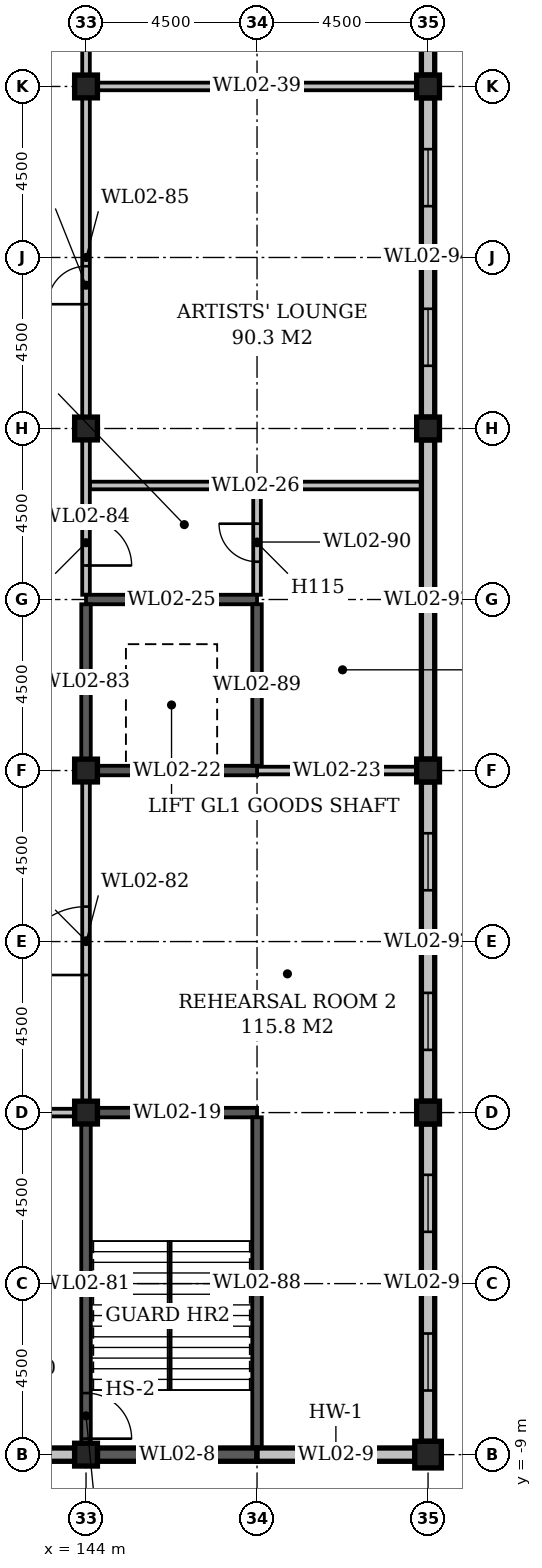
"""IFC4 building model, lengths in metres.
Left out: names, types, materials, properties, quantities, classifications, styles, units other than length and angle.
Written with IfcOpenShell. Run it as: python <this file> out.ifc"""

import sys

from ifc_helpers import new_model, si_unit, direction, frame, frame_2d, origin, origin_2d, place, context, subcontext, project, spatial, rectangle, extrude, element, fill, save


model = new_model("IFC4")
c1 = context("Model", 3, precision=1e-05, world=origin(), true_north=direction((0.0, 1.0)))
c2 = subcontext(c1, "Body", "Model", "MODEL_VIEW")
j1 = project(units=[si_unit("LENGTHUNIT", "METRE"), si_unit("PLANEANGLEUNIT", "RADIAN")], contexts=[c1])
p1 = place(None, origin())
s1 = spatial("IfcSite", under=j1, at=p1, CompositionType="ELEMENT")
p2 = place(p1, origin())
s2 = spatial("IfcBuilding", under=s1, at=p2, CompositionType="ELEMENT")
p3 = place(p2, frame((0.0, 0.0, 14.0)))
s3 = spatial("IfcBuildingStorey", under=s2, at=p3, CompositionType="ELEMENT", Elevation=14.0)
for number, where, z_axis, x_axis in (
    (1, (144.0, -9.0, 0.0), (0.0, 0.0, 1.0), (1.0, 0.0, 0.0)),
    (2, (144.0, 0.0, 0.0), (0.0, 0.0, 1.0), (1.0, 0.0, 0.0)),
    (3, (144.0, 9.0, 0.0), (0.0, 0.0, 1.0), (1.0, 0.0, 0.0)),
    (4, (144.0, 18.0, 0.0), (0.0, 0.0, 1.0), (1.0, 0.0, 0.0)),
    (5, (144.0, 27.0, 0.0), (0.0, 0.0, 1.0), (1.0, 0.0, 0.0)),
):
    element("IfcColumn", number, at=place(p3, frame(where, z_axis=z_axis, x_axis=x_axis)), inside=s3, PredefinedType="COLUMN", context=c2, shape_type="SweptSolid", body=[
        extrude(rectangle(XDim=0.6, YDim=0.6, at=origin_2d()), origin(), (0.0, 0.0, 1.0), 4.7),
    ])
p4 = place(p3, frame((153.0, -9.0, 0.0), z_axis=(0.0, 0.0, 1.0), x_axis=(1.0, 0.0, 0.0)))
e6 = element("IfcColumn", 6, at=p4, inside=s3, PredefinedType="COLUMN", context=c2, shape_type="SweptSolid", body=[
    extrude(rectangle(XDim=0.7, YDim=0.7, at=origin_2d()), origin(), (0.0, 0.0, 1.0), 4.7),
])
for number, where, z_axis, x_axis in (
    (7, (153.0, 0.0, 0.0), (0.0, 0.0, 1.0), (1.0, 0.0, 0.0)),
    (8, (153.0, 9.0, 0.0), (0.0, 0.0, 1.0), (1.0, 0.0, 0.0)),
    (9, (153.0, 18.0, 0.0), (0.0, 0.0, 1.0), (1.0, 0.0, 0.0)),
    (10, (153.0, 27.0, 0.0), (0.0, 0.0, 1.0), (1.0, 0.0, 0.0)),
):
    element("IfcColumn", number, at=place(p3, frame(where, z_axis=z_axis, x_axis=x_axis)), inside=s3, PredefinedType="COLUMN", context=c2, shape_type="SweptSolid", body=[
        extrude(rectangle(XDim=0.6, YDim=0.6, at=origin_2d()), origin(), (0.0, 0.0, 1.0), 4.7),
    ])
p5 = place(p3, frame((135.3, -9.0, 0.0), z_axis=(0.0, 0.0, 1.0), x_axis=(1.0, 0.0, 0.0)))
e11 = element("IfcWall", 11, at=p5, inside=s3, PredefinedType="STANDARD", context=c2, shape_type="SweptSolid", body=[
    extrude(rectangle(XDim=8.4, YDim=0.35, at=frame_2d((4.2, 0.0))), origin(), (0.0, 0.0, 1.0), 4.1),
])
p6 = place(p5, frame((1.35, 0.0, 1.0)))
e12 = element("IfcOpeningElement", 12, at=p6, cuts=e11, PredefinedType="OPENING", context=c2, shape_type="SweptSolid", body=[
    extrude(rectangle(XDim=1.5, YDim=2.4, at=frame_2d((0.75, 1.2))), frame((0.0, 0.187, 0.0), z_axis=(0.0, -1.0, 0.0), x_axis=(1.0, 0.0, 0.0)), (0.0, 0.0, 1.0), 0.374),
])
p7 = place(p3, frame((144.3, -9.0, 0.0), z_axis=(0.0, 0.0, 1.0), x_axis=(1.0, 0.0, 0.0)))
e13 = element("IfcWall", 13, at=p7, inside=s3, PredefinedType="STANDARD", context=c2, shape_type="SweptSolid", body=[
    extrude(rectangle(XDim=4.2, YDim=0.35, at=frame_2d((2.1, 0.0))), origin(), (0.0, 0.0, 1.0), 5.0),
])
p8 = place(p3, frame((148.5, -9.0, 0.0), z_axis=(0.0, 0.0, 1.0), x_axis=(1.0, 0.0, 0.0)))
e14 = element("IfcWall", 14, at=p8, inside=s3, PredefinedType="STANDARD", context=c2, shape_type="SweptSolid", body=[
    extrude(rectangle(XDim=4.15, YDim=0.35, at=frame_2d((2.075, 0.0))), origin(), (0.0, 0.0, 1.0), 4.1),
])
p9 = place(p8, frame((1.325, 0.0, 1.0)))
e15 = element("IfcOpeningElement", 15, at=p9, cuts=e14, PredefinedType="OPENING", context=c2, shape_type="SweptSolid", body=[
    extrude(rectangle(XDim=1.5, YDim=2.4, at=frame_2d((0.75, 1.2))), frame((0.0, 0.187, 0.0), z_axis=(0.0, -1.0, 0.0), x_axis=(1.0, 0.0, 0.0)), (0.0, 0.0, 1.0), 0.374),
])
p10 = place(p3, frame((135.4, 0.0, 0.0), z_axis=(0.0, 0.0, 1.0), x_axis=(1.0, 0.0, 0.0)))
e16 = element("IfcWall", 16, at=p10, inside=s3, PredefinedType="STANDARD", context=c2, shape_type="SweptSolid", body=[
    extrude(rectangle(XDim=8.3, YDim=0.2, at=frame_2d((4.15, 0.0))), origin(), (0.0, 0.0, 1.0), 4.7),
])
p11 = place(p10, frame((5.77, 0.0, 0.0)))
e17 = element("IfcOpeningElement", 17, at=p11, cuts=e16, PredefinedType="OPENING", context=c2, shape_type="SweptSolid", body=[
    extrude(rectangle(XDim=1.2, YDim=2.1, at=frame_2d((0.6, 1.05))), frame((0.0, 0.112, 0.0), z_axis=(0.0, -1.0, 0.0), x_axis=(1.0, 0.0, 0.0)), (0.0, 0.0, 1.0), 0.224),
])
p12 = place(p10, frame((1.37, 0.0, 0.0)))
e18 = element("IfcOpeningElement", 18, at=p12, cuts=e16, PredefinedType="OPENING", context=c2, shape_type="SweptSolid", body=[
    extrude(rectangle(XDim=1.0, YDim=2.1, at=frame_2d((0.5, 1.05))), frame((0.0, 0.112, 0.0), z_axis=(0.0, -1.0, 0.0), x_axis=(1.0, 0.0, 0.0)), (0.0, 0.0, 1.0), 0.224),
])
for number, where, z_axis, x_axis in (
    (19, (144.3, 0.0, 0.0), (0.0, 0.0, 1.0), (1.0, 0.0, 0.0)),
    (20, (144.3, 9.0, 0.0), (0.0, 0.0, 1.0), (1.0, 0.0, 0.0)),
):
    element("IfcWall", number, at=place(p3, frame(where, z_axis=z_axis, x_axis=x_axis)), inside=s3, PredefinedType="STANDARD", context=c2, shape_type="SweptSolid", body=[
        extrude(rectangle(XDim=4.2, YDim=0.25, at=frame_2d((2.1, 0.0))), origin(), (0.0, 0.0, 1.0), 5.0),
    ])
p13 = place(p3, frame((148.5, 9.0, 0.0), z_axis=(0.0, 0.0, 1.0), x_axis=(1.0, 0.0, 0.0)))
e21 = element("IfcWall", 21, at=p13, inside=s3, PredefinedType="STANDARD", context=c2, shape_type="SweptSolid", body=[
    extrude(rectangle(XDim=4.2, YDim=0.2, at=frame_2d((2.1, 0.0))), origin(), (0.0, 0.0, 1.0), 4.7),
])
p14 = place(p3, frame((144.0, 13.5, 0.0), z_axis=(0.0, 0.0, 1.0), x_axis=(1.0, 0.0, 0.0)))
e22 = element("IfcWall", 22, at=p14, inside=s3, PredefinedType="STANDARD", context=c2, shape_type="SweptSolid", body=[
    extrude(rectangle(XDim=4.5, YDim=0.25, at=frame_2d((2.25, 0.0))), origin(), (0.0, 0.0, 1.0), 5.0),
])
p15 = place(p14, frame((1.72, 0.0, 0.0)))
e23 = element("IfcOpeningElement", 23, at=p15, cuts=e22, PredefinedType="OPENING", context=c2, shape_type="SweptSolid", body=[
    extrude(rectangle(XDim=1.1, YDim=2.1, at=frame_2d((0.55, 1.05))), frame((0.0, 0.137, 0.0), z_axis=(0.0, -1.0, 0.0), x_axis=(1.0, 0.0, 0.0)), (0.0, 0.0, 1.0), 0.274),
])
p16 = place(p3, frame((144.1, 16.5, 0.0), z_axis=(0.0, 0.0, 1.0), x_axis=(1.0, 0.0, 0.0)))
e24 = element("IfcWall", 24, at=p16, inside=s3, PredefinedType="STANDARD", context=c2, shape_type="SweptSolid", body=[
    extrude(rectangle(XDim=8.725, YDim=0.2, at=frame_2d((4.362, 0.0))), origin(), (0.0, 0.0, 1.0), 4.7),
])
p17 = place(p3, frame((144.3, 27.0, 0.0), z_axis=(0.0, 0.0, 1.0), x_axis=(1.0, 0.0, 0.0)))
e25 = element("IfcWall", 25, at=p17, inside=s3, PredefinedType="STANDARD", context=c2, shape_type="SweptSolid", body=[
    extrude(rectangle(XDim=8.4, YDim=0.2, at=frame_2d((4.2, 0.0))), origin(), (0.0, 0.0, 1.0), 4.7),
])
p18 = place(p3, frame((144.0, -8.7, 0.0), z_axis=(0.0, 0.0, 1.0), x_axis=(0.0, 1.0, 0.0)))
e26 = element("IfcWall", 26, at=p18, inside=s3, PredefinedType="STANDARD", context=c2, shape_type="SweptSolid", body=[
    extrude(rectangle(XDim=8.4, YDim=0.25, at=frame_2d((4.2, 0.0))), origin(), (0.0, 0.0, 1.0), 5.0),
])
p19 = place(p18, frame((0.12, 0.0, 0.0)))
e27 = element("IfcOpeningElement", 27, at=p19, cuts=e26, PredefinedType="OPENING", context=c2, shape_type="SweptSolid", body=[
    extrude(rectangle(XDim=1.2, YDim=2.1, at=frame_2d((0.6, 1.05))), frame((0.0, 0.137, 0.0), z_axis=(0.0, -1.0, 0.0), x_axis=(1.0, 0.0, 0.0)), (0.0, 0.0, 1.0), 0.274),
])
p20 = place(p3, frame((144.0, 0.3, 0.0), z_axis=(0.0, 0.0, 1.0), x_axis=(0.0, 1.0, 0.0)))
e28 = element("IfcWall", 28, at=p20, inside=s3, PredefinedType="STANDARD", context=c2, shape_type="SweptSolid", body=[
    extrude(rectangle(XDim=8.4, YDim=0.2, at=frame_2d((4.2, 0.0))), origin(), (0.0, 0.0, 1.0), 4.7),
])
p21 = place(p20, frame((3.32, 0.0, 0.0)))
e29 = element("IfcOpeningElement", 29, at=p21, cuts=e28, PredefinedType="OPENING", context=c2, shape_type="SweptSolid", body=[
    extrude(rectangle(XDim=1.8, YDim=2.4, at=frame_2d((0.9, 1.2))), frame((0.0, 0.112, 0.0), z_axis=(0.0, -1.0, 0.0), x_axis=(1.0, 0.0, 0.0)), (0.0, 0.0, 1.0), 0.224),
])
p22 = place(p3, frame((144.0, 9.3, 0.0), z_axis=(0.0, 0.0, 1.0), x_axis=(0.0, 1.0, 0.0)))
e30 = element("IfcWall", 30, at=p22, inside=s3, PredefinedType="STANDARD", context=c2, shape_type="SweptSolid", body=[
    extrude(rectangle(XDim=4.075, YDim=0.25, at=frame_2d((2.038, 0.0))), origin(), (0.0, 0.0, 1.0), 5.0),
])
p23 = place(p3, frame((144.0, 13.625, 0.0), z_axis=(0.0, 0.0, 1.0), x_axis=(0.0, 1.0, 0.0)))
e31 = element("IfcWall", 31, at=p23, inside=s3, PredefinedType="STANDARD", context=c2, shape_type="SweptSolid", body=[
    extrude(rectangle(XDim=4.075, YDim=0.2, at=frame_2d((2.038, 0.0))), origin(), (0.0, 0.0, 1.0), 4.7),
])
p24 = place(p23, frame((0.77, 0.0, 0.0)))
e32 = element("IfcOpeningElement", 32, at=p24, cuts=e31, PredefinedType="OPENING", context=c2, shape_type="SweptSolid", body=[
    extrude(rectangle(XDim=1.2, YDim=2.1, at=frame_2d((0.6, 1.05))), frame((0.0, 0.112, 0.0), z_axis=(0.0, -1.0, 0.0), x_axis=(1.0, 0.0, 0.0)), (0.0, 0.0, 1.0), 0.224),
])
p25 = place(p3, frame((144.0, 18.3, 0.0), z_axis=(0.0, 0.0, 1.0), x_axis=(0.0, 1.0, 0.0)))
e33 = element("IfcWall", 33, at=p25, inside=s3, PredefinedType="STANDARD", context=c2, shape_type="SweptSolid", body=[
    extrude(rectangle(XDim=8.4, YDim=0.2, at=frame_2d((4.2, 0.0))), origin(), (0.0, 0.0, 1.0), 4.7),
])
p26 = place(p25, frame((2.97, 0.0, 0.0)))
e34 = element("IfcOpeningElement", 34, at=p26, cuts=e33, PredefinedType="OPENING", context=c2, shape_type="SweptSolid", body=[
    extrude(rectangle(XDim=1.0, YDim=2.1, at=frame_2d((0.5, 1.05))), frame((0.0, 0.112, 0.0), z_axis=(0.0, -1.0, 0.0), x_axis=(1.0, 0.0, 0.0)), (0.0, 0.0, 1.0), 0.224),
])
p27 = place(p3, frame((144.0, 27.3, 0.0), z_axis=(0.0, 0.0, 1.0), x_axis=(0.0, 1.0, 0.0)))
e35 = element("IfcWall", 35, at=p27, inside=s3, PredefinedType="STANDARD", context=c2, shape_type="SweptSolid", body=[
    extrude(rectangle(XDim=8.4, YDim=0.2, at=frame_2d((4.2, 0.0))), origin(), (0.0, 0.0, 1.0), 4.7),
])
p28 = place(p27, frame((3.72, 0.0, 0.0)))
e36 = element("IfcOpeningElement", 36, at=p28, cuts=e35, PredefinedType="OPENING", context=c2, shape_type="SweptSolid", body=[
    extrude(rectangle(XDim=1.0, YDim=2.1, at=frame_2d((0.5, 1.05))), frame((0.0, 0.112, 0.0), z_axis=(0.0, -1.0, 0.0), x_axis=(1.0, 0.0, 0.0)), (0.0, 0.0, 1.0), 0.224),
])
p29 = place(p3, frame((148.5, -8.825, 0.0), z_axis=(0.0, 0.0, 1.0), x_axis=(0.0, 1.0, 0.0)))
e37 = element("IfcWall", 37, at=p29, inside=s3, PredefinedType="STANDARD", context=c2, shape_type="SweptSolid", body=[
    extrude(rectangle(XDim=8.7, YDim=0.25, at=frame_2d((4.35, 0.0))), origin(), (0.0, 0.0, 1.0), 5.0),
])
p30 = place(p3, frame((148.5, 9.125, 0.0), z_axis=(0.0, 0.0, 1.0), x_axis=(0.0, 1.0, 0.0)))
e38 = element("IfcWall", 38, at=p30, inside=s3, PredefinedType="STANDARD", context=c2, shape_type="SweptSolid", body=[
    extrude(rectangle(XDim=4.25, YDim=0.25, at=frame_2d((2.125, 0.0))), origin(), (0.0, 0.0, 1.0), 5.0),
])
p31 = place(p3, frame((148.5, 13.625, 0.0), z_axis=(0.0, 0.0, 1.0), x_axis=(0.0, 1.0, 0.0)))
e39 = element("IfcWall", 39, at=p31, inside=s3, PredefinedType="STANDARD", context=c2, shape_type="SweptSolid", body=[
    extrude(rectangle(XDim=2.775, YDim=0.2, at=frame_2d((1.387, 0.0))), origin(), (0.0, 0.0, 1.0), 4.7),
])
p32 = place(p31, frame((0.87, 0.0, 0.0)))
e40 = element("IfcOpeningElement", 40, at=p32, cuts=e39, PredefinedType="OPENING", context=c2, shape_type="SweptSolid", body=[
    extrude(rectangle(XDim=1.0, YDim=2.1, at=frame_2d((0.5, 1.05))), frame((0.0, 0.112, 0.0), z_axis=(0.0, -1.0, 0.0), x_axis=(1.0, 0.0, 0.0)), (0.0, 0.0, 1.0), 0.224),
])
p33 = place(p3, frame((153.0, -8.65, 0.0), z_axis=(0.0, 0.0, 1.0), x_axis=(0.0, 1.0, 0.0)))
e41 = element("IfcWall", 41, at=p33, inside=s3, PredefinedType="STANDARD", context=c2, shape_type="SweptSolid", body=[
    extrude(rectangle(XDim=8.35, YDim=0.35, at=frame_2d((4.175, 0.0))), origin(), (0.0, 0.0, 1.0), 4.1),
])
p34 = place(p33, frame((1.337, 0.0, 1.0)))
e42 = element("IfcOpeningElement", 42, at=p34, cuts=e41, PredefinedType="OPENING", context=c2, shape_type="SweptSolid", body=[
    extrude(rectangle(XDim=1.5, YDim=2.4, at=frame_2d((0.75, 1.2))), frame((0.0, 0.187, 0.0), z_axis=(0.0, -1.0, 0.0), x_axis=(1.0, 0.0, 0.0)), (0.0, 0.0, 1.0), 0.374),
])
p35 = place(p33, frame((5.512, 0.0, 1.0)))
e43 = element("IfcOpeningElement", 43, at=p35, cuts=e41, PredefinedType="OPENING", context=c2, shape_type="SweptSolid", body=[
    extrude(rectangle(XDim=1.5, YDim=2.4, at=frame_2d((0.75, 1.2))), frame((0.0, 0.187, 0.0), z_axis=(0.0, -1.0, 0.0), x_axis=(1.0, 0.0, 0.0)), (0.0, 0.0, 1.0), 0.374),
])
p36 = place(p3, frame((153.0, 0.3, 0.0), z_axis=(0.0, 0.0, 1.0), x_axis=(0.0, 1.0, 0.0)))
e44 = element("IfcWall", 44, at=p36, inside=s3, PredefinedType="STANDARD", context=c2, shape_type="SweptSolid", body=[
    extrude(rectangle(XDim=8.4, YDim=0.35, at=frame_2d((4.2, 0.0))), origin(), (0.0, 0.0, 1.0), 4.1),
])
p37 = place(p36, frame((1.35, 0.0, 1.0)))
e45 = element("IfcOpeningElement", 45, at=p37, cuts=e44, PredefinedType="OPENING", context=c2, shape_type="SweptSolid", body=[
    extrude(rectangle(XDim=1.5, YDim=2.4, at=frame_2d((0.75, 1.2))), frame((0.0, 0.187, 0.0), z_axis=(0.0, -1.0, 0.0), x_axis=(1.0, 0.0, 0.0)), (0.0, 0.0, 1.0), 0.374),
])
p38 = place(p36, frame((5.55, 0.0, 1.0)))
e46 = element("IfcOpeningElement", 46, at=p38, cuts=e44, PredefinedType="OPENING", context=c2, shape_type="SweptSolid", body=[
    extrude(rectangle(XDim=1.5, YDim=2.4, at=frame_2d((0.75, 1.2))), frame((0.0, 0.187, 0.0), z_axis=(0.0, -1.0, 0.0), x_axis=(1.0, 0.0, 0.0)), (0.0, 0.0, 1.0), 0.374),
])
p39 = place(p3, frame((153.0, 9.3, 0.0), z_axis=(0.0, 0.0, 1.0), x_axis=(0.0, 1.0, 0.0)))
e47 = element("IfcWall", 47, at=p39, inside=s3, PredefinedType="STANDARD", context=c2, shape_type="SweptSolid", body=[
    extrude(rectangle(XDim=8.4, YDim=0.35, at=frame_2d((4.2, 0.0))), origin(), (0.0, 0.0, 1.0), 4.1),
])
p40 = place(p3, frame((153.0, 18.3, 0.0), z_axis=(0.0, 0.0, 1.0), x_axis=(0.0, 1.0, 0.0)))
e48 = element("IfcWall", 48, at=p40, inside=s3, PredefinedType="STANDARD", context=c2, shape_type="SweptSolid", body=[
    extrude(rectangle(XDim=8.4, YDim=0.35, at=frame_2d((4.2, 0.0))), origin(), (0.0, 0.0, 1.0), 4.1),
])
p41 = place(p40, frame((1.35, 0.0, 1.0)))
e49 = element("IfcOpeningElement", 49, at=p41, cuts=e48, PredefinedType="OPENING", context=c2, shape_type="SweptSolid", body=[
    extrude(rectangle(XDim=1.5, YDim=2.4, at=frame_2d((0.75, 1.2))), frame((0.0, 0.187, 0.0), z_axis=(0.0, -1.0, 0.0), x_axis=(1.0, 0.0, 0.0)), (0.0, 0.0, 1.0), 0.374),
])
p42 = place(p40, frame((5.55, 0.0, 1.0)))
e50 = element("IfcOpeningElement", 50, at=p42, cuts=e48, PredefinedType="OPENING", context=c2, shape_type="SweptSolid", body=[
    extrude(rectangle(XDim=1.5, YDim=2.4, at=frame_2d((0.75, 1.2))), frame((0.0, 0.187, 0.0), z_axis=(0.0, -1.0, 0.0), x_axis=(1.0, 0.0, 0.0)), (0.0, 0.0, 1.0), 0.374),
])
p43 = place(p3, frame((153.0, 27.3, 0.0), z_axis=(0.0, 0.0, 1.0), x_axis=(0.0, 1.0, 0.0)))
e51 = element("IfcWall", 51, at=p43, inside=s3, PredefinedType="STANDARD", context=c2, shape_type="SweptSolid", body=[
    extrude(rectangle(XDim=8.4, YDim=0.35, at=frame_2d((4.2, 0.0))), origin(), (0.0, 0.0, 1.0), 4.1),
])
p44 = place(p43, frame((1.35, 0.0, 1.0)))
e52 = element("IfcOpeningElement", 52, at=p44, cuts=e51, PredefinedType="OPENING", context=c2, shape_type="SweptSolid", body=[
    extrude(rectangle(XDim=1.5, YDim=2.4, at=frame_2d((0.75, 1.2))), frame((0.0, 0.187, 0.0), z_axis=(0.0, -1.0, 0.0), x_axis=(1.0, 0.0, 0.0)), (0.0, 0.0, 1.0), 0.374),
])
p45 = place(p43, frame((5.55, 0.0, 1.0)))
e53 = element("IfcOpeningElement", 53, at=p45, cuts=e51, PredefinedType="OPENING", context=c2, shape_type="SweptSolid", body=[
    extrude(rectangle(XDim=1.5, YDim=2.4, at=frame_2d((0.75, 1.2))), frame((0.0, 0.187, 0.0), z_axis=(0.0, -1.0, 0.0), x_axis=(1.0, 0.0, 0.0)), (0.0, 0.0, 1.0), 0.374),
])
p46 = place(p24, frame((1.2, 0.0, 0.0), z_axis=(0.0, 0.0, 1.0), x_axis=(-1.0, 0.0, 0.0)))
e54 = element("IfcDoor", 54, at=p46, inside=s3, OperationType="SINGLE_SWING_RIGHT", PredefinedType="DOOR", context=c2, shape_type="SweptSolid", body=[
    extrude(rectangle(XDim=1.2, YDim=2.1, at=frame_2d((0.6, 1.05))), frame((0.0, 0.025, 0.0), z_axis=(0.0, -1.0, 0.0), x_axis=(1.0, 0.0, 0.0)), (0.0, 0.0, 1.0), 0.05),
])
fill(e32, e54)
p47 = place(p19, frame((1.2, 0.0, 0.0), z_axis=(0.0, 0.0, 1.0), x_axis=(-1.0, 0.0, 0.0)))
e55 = element("IfcDoor", 55, at=p47, inside=s3, OperationType="SINGLE_SWING_RIGHT", PredefinedType="DOOR", context=c2, shape_type="SweptSolid", body=[
    extrude(rectangle(XDim=1.2, YDim=2.1, at=frame_2d((0.6, 1.05))), frame((0.0, 0.025, 0.0), z_axis=(0.0, -1.0, 0.0), x_axis=(1.0, 0.0, 0.0)), (0.0, 0.0, 1.0), 0.05),
])
fill(e27, e55)
p48 = place(p21, origin())
e56 = element("IfcDoor", 56, at=p48, inside=s3, OperationType="DOUBLE_DOOR_SINGLE_SWING", PredefinedType="DOOR", context=c2, shape_type="SweptSolid", body=[
    extrude(rectangle(XDim=1.8, YDim=2.4, at=frame_2d((0.9, 1.2))), frame((0.0, 0.025, 0.0), z_axis=(0.0, -1.0, 0.0), x_axis=(1.0, 0.0, 0.0)), (0.0, 0.0, 1.0), 0.05),
])
fill(e29, e56)
p49 = place(p32, frame((1.0, 0.0, 0.0), z_axis=(0.0, 0.0, 1.0), x_axis=(-1.0, 0.0, 0.0)))
e57 = element("IfcDoor", 57, at=p49, inside=s3, OperationType="SINGLE_SWING_LEFT", PredefinedType="DOOR", context=c2, shape_type="SweptSolid", body=[
    extrude(rectangle(XDim=1.0, YDim=2.1, at=frame_2d((0.5, 1.05))), frame((0.0, 0.025, 0.0), z_axis=(0.0, -1.0, 0.0), x_axis=(1.0, 0.0, 0.0)), (0.0, 0.0, 1.0), 0.05),
])
fill(e40, e57)
p50 = place(p26, origin())
e58 = element("IfcDoor", 58, at=p50, inside=s3, OperationType="SINGLE_SWING_LEFT", PredefinedType="DOOR", context=c2, shape_type="SweptSolid", body=[
    extrude(rectangle(XDim=1.0, YDim=2.1, at=frame_2d((0.5, 1.05))), frame((0.0, 0.025, 0.0), z_axis=(0.0, -1.0, 0.0), x_axis=(1.0, 0.0, 0.0)), (0.0, 0.0, 1.0), 0.05),
])
fill(e34, e58)
p51 = place(p15, origin())
e59 = element("IfcDoor", 59, at=p51, inside=s3, OperationType="SLIDING_TO_LEFT", PredefinedType="DOOR", context=c2, shape_type="SweptSolid", body=[
    extrude(rectangle(XDim=1.1, YDim=2.1, at=frame_2d((0.55, 1.05))), frame((0.0, 0.025, 0.0), z_axis=(0.0, -1.0, 0.0), x_axis=(1.0, 0.0, 0.0)), (0.0, 0.0, 1.0), 0.05),
])
fill(e23, e59)
p52 = place(p9, origin())
e60 = element("IfcWindow", 60, at=p52, inside=s3, PartitioningType="SINGLE_PANEL", PredefinedType="WINDOW", context=c2, shape_type="SweptSolid", body=[
    extrude(rectangle(XDim=1.5, YDim=2.4, at=frame_2d((0.75, 1.2))), frame((0.0, 0.03, 0.0), z_axis=(0.0, -1.0, 0.0), x_axis=(1.0, 0.0, 0.0)), (0.0, 0.0, 1.0), 0.06),
])
fill(e15, e60)
p53 = place(p34, origin())
e61 = element("IfcWindow", 61, at=p53, inside=s3, PartitioningType="SINGLE_PANEL", PredefinedType="WINDOW", context=c2, shape_type="SweptSolid", body=[
    extrude(rectangle(XDim=1.5, YDim=2.4, at=frame_2d((0.75, 1.2))), frame((0.0, 0.03, 0.0), z_axis=(0.0, -1.0, 0.0), x_axis=(1.0, 0.0, 0.0)), (0.0, 0.0, 1.0), 0.06),
])
fill(e42, e61)
p54 = place(p35, origin())
e62 = element("IfcWindow", 62, at=p54, inside=s3, PartitioningType="SINGLE_PANEL", PredefinedType="WINDOW", context=c2, shape_type="SweptSolid", body=[
    extrude(rectangle(XDim=1.5, YDim=2.4, at=frame_2d((0.75, 1.2))), frame((0.0, 0.03, 0.0), z_axis=(0.0, -1.0, 0.0), x_axis=(1.0, 0.0, 0.0)), (0.0, 0.0, 1.0), 0.06),
])
fill(e43, e62)
p55 = place(p37, origin())
e63 = element("IfcWindow", 63, at=p55, inside=s3, PartitioningType="SINGLE_PANEL", PredefinedType="WINDOW", context=c2, shape_type="SweptSolid", body=[
    extrude(rectangle(XDim=1.5, YDim=2.4, at=frame_2d((0.75, 1.2))), frame((0.0, 0.03, 0.0), z_axis=(0.0, -1.0, 0.0), x_axis=(1.0, 0.0, 0.0)), (0.0, 0.0, 1.0), 0.06),
])
fill(e45, e63)
p56 = place(p38, origin())
e64 = element("IfcWindow", 64, at=p56, inside=s3, PartitioningType="SINGLE_PANEL", PredefinedType="WINDOW", context=c2, shape_type="SweptSolid", body=[
    extrude(rectangle(XDim=1.5, YDim=2.4, at=frame_2d((0.75, 1.2))), frame((0.0, 0.03, 0.0), z_axis=(0.0, -1.0, 0.0), x_axis=(1.0, 0.0, 0.0)), (0.0, 0.0, 1.0), 0.06),
])
fill(e46, e64)
p57 = place(p41, origin())
e65 = element("IfcWindow", 65, at=p57, inside=s3, PartitioningType="SINGLE_PANEL", PredefinedType="WINDOW", context=c2, shape_type="SweptSolid", body=[
    extrude(rectangle(XDim=1.5, YDim=2.4, at=frame_2d((0.75, 1.2))), frame((0.0, 0.03, 0.0), z_axis=(0.0, -1.0, 0.0), x_axis=(1.0, 0.0, 0.0)), (0.0, 0.0, 1.0), 0.06),
])
fill(e49, e65)
p58 = place(p42, origin())
e66 = element("IfcWindow", 66, at=p58, inside=s3, PartitioningType="SINGLE_PANEL", PredefinedType="WINDOW", context=c2, shape_type="SweptSolid", body=[
    extrude(rectangle(XDim=1.5, YDim=2.4, at=frame_2d((0.75, 1.2))), frame((0.0, 0.03, 0.0), z_axis=(0.0, -1.0, 0.0), x_axis=(1.0, 0.0, 0.0)), (0.0, 0.0, 1.0), 0.06),
])
fill(e50, e66)
save(model, sys.argv[1])
